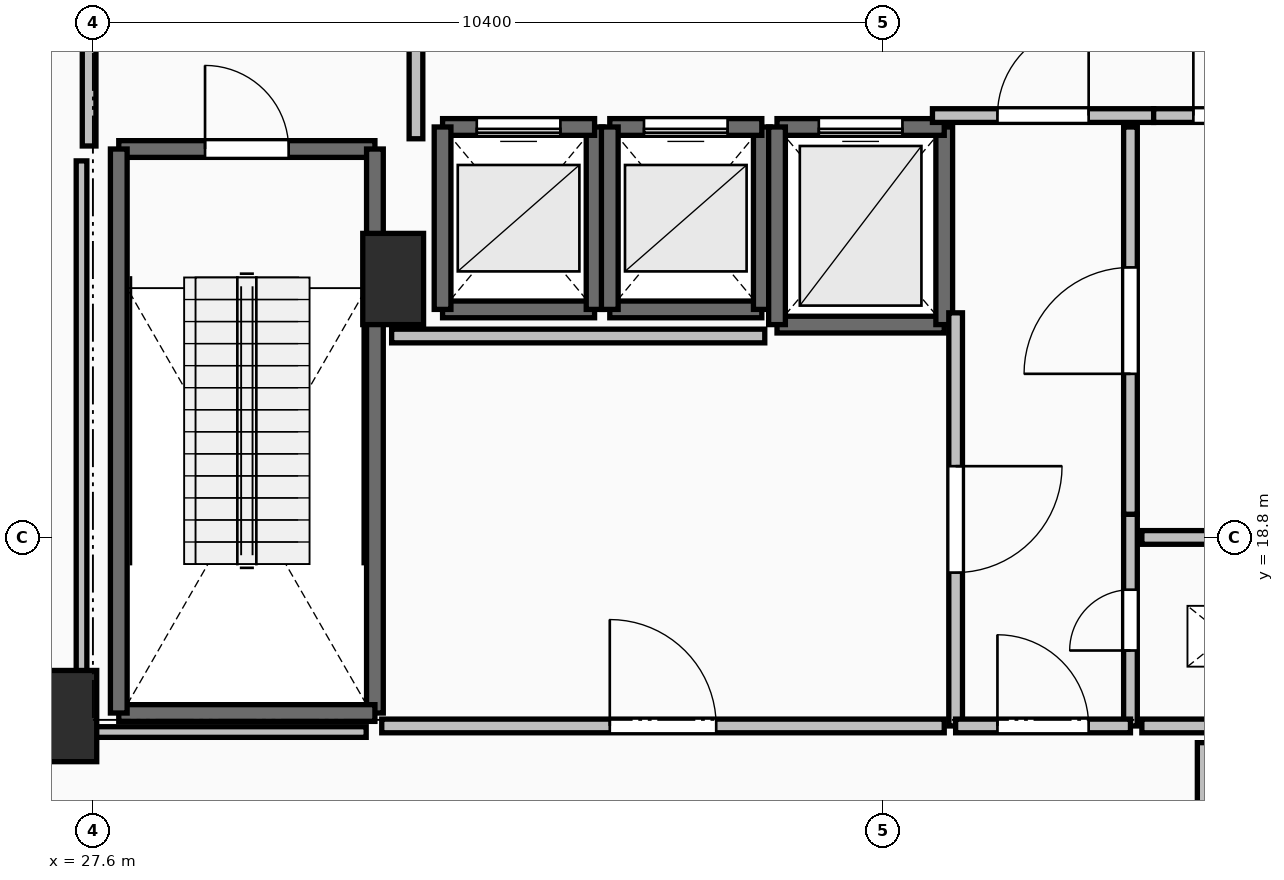
"""IFC4 building model, lengths in metres.
Left out: names, types, materials, properties, quantities, classifications, styles, units other than length and angle.
Written with IfcOpenShell. Run it as: python <this file> out.ifc"""

import sys

from ifc_helpers import new_model, si_unit, direction, frame, frame_2d, origin, origin_2d, place, context, subcontext, project, spatial, rectangle, extrude, element, fill, save


model = new_model("IFC4")
c1 = context("Model", 3, precision=1e-05, world=origin(), true_north=direction((0.0, 1.0)))
c2 = subcontext(c1, "Body", "Model", "MODEL_VIEW")
j1 = project(units=[si_unit("LENGTHUNIT", "METRE"), si_unit("PLANEANGLEUNIT", "RADIAN")], contexts=[c1])
p1 = place(None, origin())
s1 = spatial("IfcSite", under=j1, at=p1, CompositionType="ELEMENT")
p2 = place(p1, origin())
s2 = spatial("IfcBuilding", under=s1, at=p2, CompositionType="ELEMENT")
p3 = place(p2, frame((0.0, 0.0, 124.3)))
s3 = spatial("IfcBuildingStorey", under=s2, at=p3, CompositionType="ELEMENT", Elevation=124.3)
for number, where, z_axis, x_axis in (
    (1, (27.25, 16.45, 0.0), (0.0, 0.0, 1.0), (1.0, 0.0, 0.0)),
    (2, (31.55, 22.2, 0.0), (0.0, 0.0, 1.0), (1.0, 0.0, 0.0)),
):
    element("IfcColumn", number, at=place(p3, frame(where, z_axis=z_axis, x_axis=x_axis)), inside=s3, PredefinedType="PILASTER", context=c2, shape_type="SweptSolid", body=[
        extrude(rectangle(XDim=0.8, YDim=1.2, at=origin_2d()), origin(), (0.0, 0.0, 1.0), 4.8),
    ])
p4 = place(p3, frame((27.94, 23.91, 0.0), z_axis=(0.0, 0.0, 1.0), x_axis=(1.0, 0.0, 0.0)))
e3 = element("IfcWall", 3, at=p4, inside=s3, PredefinedType="SOLIDWALL", context=c2, shape_type="SweptSolid", body=[
    extrude(rectangle(XDim=3.37, YDim=0.22, at=frame_2d((1.685, 0.0))), origin(), (0.0, 0.0, 1.0), 4.54),
])
p5 = place(p4, frame((1.135, 0.0, 0.0)))
e4 = element("IfcOpeningElement", 4, at=p5, cuts=e3, PredefinedType="OPENING", context=c2, shape_type="SweptSolid", body=[
    extrude(rectangle(XDim=1.1, YDim=2.15, at=frame_2d((0.55, 1.075))), frame((0.0, 0.125, 0.0), z_axis=(0.0, -1.0, 0.0), x_axis=(1.0, 0.0, 0.0)), (0.0, 0.0, 1.0), 0.25),
])
p6 = place(p3, frame((31.31, 23.91, 0.0), z_axis=(0.0, 0.0, 1.0), x_axis=(0.0, -1.0, 0.0)))
e5 = element("IfcWall", 5, at=p6, inside=s3, PredefinedType="SOLIDWALL", context=c2, shape_type="SweptSolid", body=[
    extrude(rectangle(XDim=7.42, YDim=0.22, at=frame_2d((3.71, 0.0))), origin(), (0.0, 0.0, 1.0), 4.54),
])
p7 = place(p3, frame((31.31, 16.49, 0.0), z_axis=(0.0, 0.0, 1.0), x_axis=(-1.0, 0.0, 0.0)))
e6 = element("IfcWall", 6, at=p7, inside=s3, PredefinedType="SOLIDWALL", context=c2, shape_type="SweptSolid", body=[
    extrude(rectangle(XDim=3.37, YDim=0.22, at=frame_2d((1.685, 0.0))), origin(), (0.0, 0.0, 1.0), 4.54),
])
p8 = place(p3, frame((27.94, 16.49, 0.0), z_axis=(0.0, 0.0, 1.0), x_axis=(0.0, 1.0, 0.0)))
e7 = element("IfcWall", 7, at=p8, inside=s3, PredefinedType="SOLIDWALL", context=c2, shape_type="SweptSolid", body=[
    extrude(rectangle(XDim=7.42, YDim=0.22, at=frame_2d((3.71, 0.0))), origin(), (0.0, 0.0, 1.0), 4.54),
])
p9 = place(p3, frame((32.2, 21.8, 0.0), z_axis=(0.0, 0.0, 1.0), x_axis=(1.0, 0.0, 0.0)))
e8 = element("IfcWall", 8, at=p9, inside=s3, PredefinedType="SOLIDWALL", context=c2, shape_type="SweptSolid", body=[
    extrude(rectangle(XDim=2.0, YDim=0.22, at=frame_2d((1.0, 0.0))), origin(), (0.0, 0.0, 1.0), 4.54),
])
p10 = place(p3, frame((34.2, 21.8, 0.0), z_axis=(0.0, 0.0, 1.0), x_axis=(0.0, 1.0, 0.0)))
e9 = element("IfcWall", 9, at=p10, inside=s3, PredefinedType="SOLIDWALL", context=c2, shape_type="SweptSolid", body=[
    extrude(rectangle(XDim=2.4, YDim=0.22, at=frame_2d((1.2, 0.0))), origin(), (0.0, 0.0, 1.0), 4.54),
])
p11 = place(p3, frame((34.2, 24.2, 0.0), z_axis=(0.0, 0.0, 1.0), x_axis=(-1.0, 0.0, 0.0)))
e10 = element("IfcWall", 10, at=p11, inside=s3, PredefinedType="SOLIDWALL", context=c2, shape_type="SweptSolid", body=[
    extrude(rectangle(XDim=2.0, YDim=0.22, at=frame_2d((1.0, 0.0))), origin(), (0.0, 0.0, 1.0), 4.54),
])
p12 = place(p11, frame((0.45, 0.0, 0.0)))
e11 = element("IfcOpeningElement", 11, at=p12, cuts=e10, PredefinedType="OPENING", context=c2, shape_type="SweptSolid", body=[
    extrude(rectangle(XDim=1.1, YDim=2.2, at=frame_2d((0.55, 1.1))), frame((0.0, 0.125, 0.0), z_axis=(0.0, -1.0, 0.0), x_axis=(1.0, 0.0, 0.0)), (0.0, 0.0, 1.0), 0.25),
])
p13 = place(p3, frame((32.2, 24.2, 0.0), z_axis=(0.0, 0.0, 1.0), x_axis=(0.0, -1.0, 0.0)))
e12 = element("IfcWall", 12, at=p13, inside=s3, PredefinedType="SOLIDWALL", context=c2, shape_type="SweptSolid", body=[
    extrude(rectangle(XDim=2.4, YDim=0.22, at=frame_2d((1.2, 0.0))), origin(), (0.0, 0.0, 1.0), 4.54),
])
p14 = place(p3, frame((34.4, 21.8, 0.0), z_axis=(0.0, 0.0, 1.0), x_axis=(1.0, 0.0, 0.0)))
e13 = element("IfcWall", 13, at=p14, inside=s3, PredefinedType="SOLIDWALL", context=c2, shape_type="SweptSolid", body=[
    extrude(rectangle(XDim=2.0, YDim=0.22, at=frame_2d((1.0, 0.0))), origin(), (0.0, 0.0, 1.0), 4.54),
])
p15 = place(p3, frame((36.4, 21.8, 0.0), z_axis=(0.0, 0.0, 1.0), x_axis=(0.0, 1.0, 0.0)))
e14 = element("IfcWall", 14, at=p15, inside=s3, PredefinedType="SOLIDWALL", context=c2, shape_type="SweptSolid", body=[
    extrude(rectangle(XDim=2.4, YDim=0.22, at=frame_2d((1.2, 0.0))), origin(), (0.0, 0.0, 1.0), 4.54),
])
p16 = place(p3, frame((36.4, 24.2, 0.0), z_axis=(0.0, 0.0, 1.0), x_axis=(-1.0, 0.0, 0.0)))
e15 = element("IfcWall", 15, at=p16, inside=s3, PredefinedType="SOLIDWALL", context=c2, shape_type="SweptSolid", body=[
    extrude(rectangle(XDim=2.0, YDim=0.22, at=frame_2d((1.0, 0.0))), origin(), (0.0, 0.0, 1.0), 4.54),
])
p17 = place(p16, frame((0.45, 0.0, 0.0)))
e16 = element("IfcOpeningElement", 16, at=p17, cuts=e15, PredefinedType="OPENING", context=c2, shape_type="SweptSolid", body=[
    extrude(rectangle(XDim=1.1, YDim=2.2, at=frame_2d((0.55, 1.1))), frame((0.0, 0.125, 0.0), z_axis=(0.0, -1.0, 0.0), x_axis=(1.0, 0.0, 0.0)), (0.0, 0.0, 1.0), 0.25),
])
p18 = place(p3, frame((34.4, 24.2, 0.0), z_axis=(0.0, 0.0, 1.0), x_axis=(0.0, -1.0, 0.0)))
e17 = element("IfcWall", 17, at=p18, inside=s3, PredefinedType="SOLIDWALL", context=c2, shape_type="SweptSolid", body=[
    extrude(rectangle(XDim=2.4, YDim=0.22, at=frame_2d((1.2, 0.0))), origin(), (0.0, 0.0, 1.0), 4.54),
])
p19 = place(p3, frame((36.6, 21.6, 0.0), z_axis=(0.0, 0.0, 1.0), x_axis=(1.0, 0.0, 0.0)))
e18 = element("IfcWall", 18, at=p19, inside=s3, PredefinedType="SOLIDWALL", context=c2, shape_type="SweptSolid", body=[
    extrude(rectangle(XDim=2.2, YDim=0.22, at=frame_2d((1.1, 0.0))), origin(), (0.0, 0.0, 1.0), 4.54),
])
p20 = place(p3, frame((38.8, 21.6, 0.0), z_axis=(0.0, 0.0, 1.0), x_axis=(0.0, 1.0, 0.0)))
e19 = element("IfcWall", 19, at=p20, inside=s3, PredefinedType="SOLIDWALL", context=c2, shape_type="SweptSolid", body=[
    extrude(rectangle(XDim=2.6, YDim=0.22, at=frame_2d((1.3, 0.0))), origin(), (0.0, 0.0, 1.0), 4.54),
])
p21 = place(p3, frame((38.8, 24.2, 0.0), z_axis=(0.0, 0.0, 1.0), x_axis=(-1.0, 0.0, 0.0)))
e20 = element("IfcWall", 20, at=p21, inside=s3, PredefinedType="SOLIDWALL", context=c2, shape_type="SweptSolid", body=[
    extrude(rectangle(XDim=2.2, YDim=0.22, at=frame_2d((1.1, 0.0))), origin(), (0.0, 0.0, 1.0), 4.54),
])
p22 = place(p21, frame((0.55, 0.0, 0.0)))
e21 = element("IfcOpeningElement", 21, at=p22, cuts=e20, PredefinedType="OPENING", context=c2, shape_type="SweptSolid", body=[
    extrude(rectangle(XDim=1.1, YDim=2.2, at=frame_2d((0.55, 1.1))), frame((0.0, 0.125, 0.0), z_axis=(0.0, -1.0, 0.0), x_axis=(1.0, 0.0, 0.0)), (0.0, 0.0, 1.0), 0.25),
])
p23 = place(p3, frame((36.6, 24.2, 0.0), z_axis=(0.0, 0.0, 1.0), x_axis=(0.0, -1.0, 0.0)))
e22 = element("IfcWall", 22, at=p23, inside=s3, PredefinedType="SOLIDWALL", context=c2, shape_type="SweptSolid", body=[
    extrude(rectangle(XDim=2.6, YDim=0.22, at=frame_2d((1.3, 0.0))), origin(), (0.0, 0.0, 1.0), 4.54),
])
p24 = place(p3, frame((31.85, 24.045, 0.0), z_axis=(0.0, 0.0, 1.0), x_axis=(0.0, 1.0, 0.0)))
e23 = element("IfcWall", 23, at=p24, inside=s3, PredefinedType="PARTITIONING", context=c2, shape_type="SweptSolid", body=[
    extrude(rectangle(XDim=3.91, YDim=0.18, at=frame_2d((1.955, 0.0))), origin(), (0.0, 0.0, 1.0), 4.54),
])
p25 = place(p24, frame((1.355, 0.0, 0.0)))
e24 = element("IfcOpeningElement", 24, at=p25, cuts=e23, PredefinedType="OPENING", context=c2, shape_type="SweptSolid", body=[
    extrude(rectangle(XDim=1.2, YDim=2.15, at=frame_2d((0.6, 1.075))), frame((0.0, 0.105, 0.0), z_axis=(0.0, -1.0, 0.0), x_axis=(1.0, 0.0, 0.0)), (0.0, 0.0, 1.0), 0.21),
])
p26 = place(p3, frame((27.55, 28.0, 0.0), z_axis=(0.0, 0.0, 1.0), x_axis=(0.0, -1.0, 0.0)))
e25 = element("IfcWall", 25, at=p26, inside=s3, PredefinedType="PARTITIONING", context=c2, shape_type="SweptSolid", body=[
    extrude(rectangle(XDim=4.05, YDim=0.18, at=frame_2d((2.025, 0.0))), origin(), (0.0, 0.0, 1.0), 3.522),
])
p27 = place(p26, frame((1.425, 0.0, 0.0)))
e26 = element("IfcOpeningElement", 26, at=p27, cuts=e25, PredefinedType="OPENING", context=c2, shape_type="SweptSolid", body=[
    extrude(rectangle(XDim=1.2, YDim=2.15, at=frame_2d((0.6, 1.075))), frame((0.0, 0.105, 0.0), z_axis=(0.0, -1.0, 0.0), x_axis=(1.0, 0.0, 0.0)), (0.0, 0.0, 1.0), 0.21),
])
p28 = place(p3, frame((38.645, 24.35, 0.0), z_axis=(0.0, 0.0, 1.0), x_axis=(1.0, 0.0, 0.0)))
e27 = element("IfcWall", 27, at=p28, inside=s3, PredefinedType="PARTITIONING", context=c2, shape_type="SweptSolid", body=[
    extrude(rectangle(XDim=2.91, YDim=0.18, at=frame_2d((1.455, 0.0))), origin(), (0.0, 0.0, 1.0), 4.54),
])
p29 = place(p28, frame((0.855, 0.0, 0.0)))
e28 = element("IfcOpeningElement", 28, at=p29, cuts=e27, PredefinedType="OPENING", context=c2, shape_type="SweptSolid", body=[
    extrude(rectangle(XDim=1.2, YDim=2.15, at=frame_2d((0.6, 1.075))), frame((0.0, 0.105, 0.0), z_axis=(0.0, -1.0, 0.0), x_axis=(1.0, 0.0, 0.0)), (0.0, 0.0, 1.0), 0.21),
])
p30 = place(p3, frame((41.555, 24.35, 0.0), z_axis=(0.0, 0.0, 1.0), x_axis=(1.0, 0.0, 0.0)))
e29 = element("IfcWall", 29, at=p30, inside=s3, PredefinedType="PARTITIONING", context=c2, shape_type="SweptSolid", body=[
    extrude(rectangle(XDim=2.445, YDim=0.18, at=frame_2d((1.223, 0.0))), origin(), (0.0, 0.0, 1.0), 4.54),
])
p31 = place(p30, frame((0.522, 0.0, 0.0)))
e30 = element("IfcOpeningElement", 30, at=p31, cuts=e29, PredefinedType="OPENING", context=c2, shape_type="SweptSolid", body=[
    extrude(rectangle(XDim=1.4, YDim=2.2, at=frame_2d((0.7, 1.1))), frame((0.0, 0.105, 0.0), z_axis=(0.0, -1.0, 0.0), x_axis=(1.0, 0.0, 0.0)), (0.0, 0.0, 1.0), 0.21),
])
p32 = place(p3, frame((38.95, 21.755, 0.0), z_axis=(0.0, 0.0, 1.0), x_axis=(0.0, -1.0, 0.0)))
e31 = element("IfcWall", 31, at=p32, inside=s3, PredefinedType="PARTITIONING", context=c2, shape_type="SweptSolid", body=[
    extrude(rectangle(XDim=5.435, YDim=0.18, at=frame_2d((2.717, 0.0))), origin(), (0.0, 0.0, 1.0), 4.54),
])
p33 = place(p32, frame((2.018, 0.0, 0.0)))
e32 = element("IfcOpeningElement", 32, at=p33, cuts=e31, PredefinedType="OPENING", context=c2, shape_type="SweptSolid", body=[
    extrude(rectangle(XDim=1.4, YDim=2.2, at=frame_2d((0.7, 1.1))), frame((0.0, 0.105, 0.0), z_axis=(0.0, -1.0, 0.0), x_axis=(1.0, 0.0, 0.0)), (0.0, 0.0, 1.0), 0.21),
])
p34 = place(p3, frame((41.25, 16.32, 0.0), z_axis=(0.0, 0.0, 1.0), x_axis=(0.0, 1.0, 0.0)))
e33 = element("IfcWall", 33, at=p34, inside=s3, PredefinedType="PARTITIONING", context=c2, shape_type="SweptSolid", body=[
    extrude(rectangle(XDim=2.785, YDim=0.18, at=frame_2d((1.393, 0.0))), origin(), (0.0, 0.0, 1.0), 4.54),
])
p35 = place(p34, frame((0.992, 0.0, 0.0)))
e34 = element("IfcOpeningElement", 34, at=p35, cuts=e33, PredefinedType="OPENING", context=c2, shape_type="SweptSolid", body=[
    extrude(rectangle(XDim=0.8, YDim=2.05, at=frame_2d((0.4, 1.025))), frame((0.0, 0.105, 0.0), z_axis=(0.0, -1.0, 0.0), x_axis=(1.0, 0.0, 0.0)), (0.0, 0.0, 1.0), 0.21),
])
p36 = place(p3, frame((41.25, 19.105, 0.0), z_axis=(0.0, 0.0, 1.0), x_axis=(0.0, 1.0, 0.0)))
e35 = element("IfcWall", 35, at=p36, inside=s3, PredefinedType="PARTITIONING", context=c2, shape_type="SweptSolid", body=[
    extrude(rectangle(XDim=5.095, YDim=0.18, at=frame_2d((2.547, 0.0))), origin(), (0.0, 0.0, 1.0), 4.54),
])
p37 = place(p36, frame((1.847, 0.0, 0.0)))
e36 = element("IfcOpeningElement", 36, at=p37, cuts=e35, PredefinedType="OPENING", context=c2, shape_type="SweptSolid", body=[
    extrude(rectangle(XDim=1.4, YDim=2.2, at=frame_2d((0.7, 1.1))), frame((0.0, 0.105, 0.0), z_axis=(0.0, -1.0, 0.0), x_axis=(1.0, 0.0, 0.0)), (0.0, 0.0, 1.0), 0.21),
])
p38 = place(p3, frame((38.95, 16.32, 0.0), z_axis=(0.0, 0.0, 1.0), x_axis=(1.0, 0.0, 0.0)))
e37 = element("IfcWall", 37, at=p38, inside=s3, PredefinedType="PARTITIONING", context=c2, shape_type="SweptSolid", body=[
    extrude(rectangle(XDim=2.3, YDim=0.18, at=frame_2d((1.15, 0.0))), origin(), (0.0, 0.0, 1.0), 4.54),
])
p39 = place(p38, frame((0.55, 0.0, 0.0)))
e38 = element("IfcOpeningElement", 38, at=p39, cuts=e37, PredefinedType="OPENING", context=c2, shape_type="SweptSolid", body=[
    extrude(rectangle(XDim=1.2, YDim=2.15, at=frame_2d((0.6, 1.075))), frame((0.0, 0.105, 0.0), z_axis=(0.0, -1.0, 0.0), x_axis=(1.0, 0.0, 0.0)), (0.0, 0.0, 1.0), 0.21),
])
p40 = place(p3, frame((31.4, 16.32, 0.0), z_axis=(0.0, 0.0, 1.0), x_axis=(1.0, 0.0, 0.0)))
e39 = element("IfcWall", 39, at=p40, inside=s3, PredefinedType="PARTITIONING", context=c2, shape_type="SweptSolid", body=[
    extrude(rectangle(XDim=7.4, YDim=0.18, at=frame_2d((3.7, 0.0))), origin(), (0.0, 0.0, 1.0), 4.54),
])
p41 = place(p40, frame((3.0, 0.0, 0.0)))
e40 = element("IfcOpeningElement", 40, at=p41, cuts=e39, PredefinedType="OPENING", context=c2, shape_type="SweptSolid", body=[
    extrude(rectangle(XDim=1.4, YDim=2.2, at=frame_2d((0.7, 1.1))), frame((0.0, 0.105, 0.0), z_axis=(0.0, -1.0, 0.0), x_axis=(1.0, 0.0, 0.0)), (0.0, 0.0, 1.0), 0.21),
])
p42 = place(p3, frame((44.6, 18.8, 0.0), z_axis=(0.0, 0.0, 1.0), x_axis=(-1.0, 0.0, 0.0)))
e41 = element("IfcWall", 41, at=p42, inside=s3, PredefinedType="PARTITIONING", context=c2, shape_type="SweptSolid", body=[
    extrude(rectangle(XDim=3.2, YDim=0.18, at=frame_2d((1.6, 0.0))), origin(), (0.0, 0.0, 1.0), 4.54),
])
p43 = place(p3, frame((41.4, 16.32, 0.0), z_axis=(0.0, 0.0, 1.0), x_axis=(1.0, 0.0, 0.0)))
e42 = element("IfcWall", 42, at=p43, inside=s3, PredefinedType="PARTITIONING", context=c2, shape_type="SweptSolid", body=[
    extrude(rectangle(XDim=3.2, YDim=0.18, at=frame_2d((1.6, 0.0))), origin(), (0.0, 0.0, 1.0), 4.54),
])
p44 = place(p43, frame((1.2, 0.0, 0.0)))
e43 = element("IfcOpeningElement", 43, at=p44, cuts=e42, PredefinedType="OPENING", context=c2, shape_type="SweptSolid", body=[
    extrude(rectangle(XDim=0.8, YDim=2.05, at=frame_2d((0.4, 1.025))), frame((0.0, 0.105, 0.0), z_axis=(0.0, -1.0, 0.0), x_axis=(1.0, 0.0, 0.0)), (0.0, 0.0, 1.0), 0.21),
])
p45 = place(p3, frame((36.439, 21.45, 0.0), z_axis=(0.0, 0.0, 1.0), x_axis=(-1.0, 0.0, 0.0)))
e44 = element("IfcWall", 44, at=p45, inside=s3, PredefinedType="PARTITIONING", context=c2, shape_type="SweptSolid", body=[
    extrude(rectangle(XDim=4.909, YDim=0.18, at=frame_2d((2.455, 0.0))), origin(), (0.0, 0.0, 1.0), 4.54),
])
p46 = place(p3, frame((27.45, 23.754, 0.0), z_axis=(0.0, 0.0, 1.0), x_axis=(0.0, -1.0, 0.0)))
e45 = element("IfcWall", 45, at=p46, inside=s3, PredefinedType="PARTITIONING", context=c2, shape_type="SweptSolid", body=[
    extrude(rectangle(XDim=7.514, YDim=0.14, at=frame_2d((3.757, 0.0))), origin(), (0.0, 0.0, 1.0), 3.522),
])
p47 = place(p3, frame((27.45, 16.24, 0.0), z_axis=(0.0, 0.0, 1.0), x_axis=(1.0, 0.0, 0.0)))
e46 = element("IfcWall", 46, at=p47, inside=s3, PredefinedType="PARTITIONING", context=c2, shape_type="SweptSolid", body=[
    extrude(rectangle(XDim=3.745, YDim=0.14, at=frame_2d((1.873, 0.0))), origin(), (0.0, 0.0, 1.0), 3.522),
])
p48 = place(p3, frame((42.2, 16.1, 0.0), z_axis=(0.0, 0.0, 1.0), x_axis=(0.0, -1.0, 0.0)))
e47 = element("IfcWall", 47, at=p48, inside=s3, PredefinedType="PARTITIONING", context=c2, shape_type="SweptSolid", body=[
    extrude(rectangle(XDim=1.83, YDim=0.14, at=frame_2d((0.915, 0.0))), origin(), (0.0, 0.0, 1.0), 4.54),
])
p49 = place(p5, origin())
e48 = element("IfcDoor", 48, at=p49, inside=s3, OperationType="SINGLE_SWING_LEFT", PredefinedType="DOOR", context=c2, shape_type="SweptSolid", body=[
    extrude(rectangle(XDim=1.1, YDim=2.15, at=frame_2d((0.55, 1.075))), frame((0.0, 0.025, 0.0), z_axis=(0.0, -1.0, 0.0), x_axis=(1.0, 0.0, 0.0)), (0.0, 0.0, 1.0), 0.05),
])
fill(e4, e48)
p50 = place(p12, origin())
e49 = element("IfcDoor", 49, at=p50, inside=s3, OperationType="SLIDING_TO_LEFT", PredefinedType="DOOR", context=c2, shape_type="SweptSolid", body=[
    extrude(rectangle(XDim=1.1, YDim=2.2, at=frame_2d((0.55, 1.1))), frame((0.0, 0.025, 0.0), z_axis=(0.0, -1.0, 0.0), x_axis=(1.0, 0.0, 0.0)), (0.0, 0.0, 1.0), 0.05),
])
fill(e11, e49)
p51 = place(p17, origin())
e50 = element("IfcDoor", 50, at=p51, inside=s3, OperationType="SLIDING_TO_LEFT", PredefinedType="DOOR", context=c2, shape_type="SweptSolid", body=[
    extrude(rectangle(XDim=1.1, YDim=2.2, at=frame_2d((0.55, 1.1))), frame((0.0, 0.025, 0.0), z_axis=(0.0, -1.0, 0.0), x_axis=(1.0, 0.0, 0.0)), (0.0, 0.0, 1.0), 0.05),
])
fill(e16, e50)
p52 = place(p22, origin())
e51 = element("IfcDoor", 51, at=p52, inside=s3, OperationType="SLIDING_TO_LEFT", PredefinedType="DOOR", context=c2, shape_type="SweptSolid", body=[
    extrude(rectangle(XDim=1.1, YDim=2.2, at=frame_2d((0.55, 1.1))), frame((0.0, 0.025, 0.0), z_axis=(0.0, -1.0, 0.0), x_axis=(1.0, 0.0, 0.0)), (0.0, 0.0, 1.0), 0.05),
])
fill(e21, e51)
p53 = place(p29, origin())
e52 = element("IfcDoor", 52, at=p53, inside=s3, OperationType="SINGLE_SWING_RIGHT", PredefinedType="DOOR", context=c2, shape_type="SweptSolid", body=[
    extrude(rectangle(XDim=1.2, YDim=2.15, at=frame_2d((0.6, 1.075))), frame((0.0, 0.025, 0.0), z_axis=(0.0, -1.0, 0.0), x_axis=(1.0, 0.0, 0.0)), (0.0, 0.0, 1.0), 0.05),
])
fill(e28, e52)
p54 = place(p31, origin())
e53 = element("IfcDoor", 53, at=p54, inside=s3, OperationType="DOUBLE_SWING_LEFT", PredefinedType="DOOR", context=c2, shape_type="SweptSolid", body=[
    extrude(rectangle(XDim=1.4, YDim=2.2, at=frame_2d((0.7, 1.1))), frame((0.0, 0.025, 0.0), z_axis=(0.0, -1.0, 0.0), x_axis=(1.0, 0.0, 0.0)), (0.0, 0.0, 1.0), 0.05),
])
fill(e30, e53)
p55 = place(p33, origin())
e54 = element("IfcDoor", 54, at=p55, inside=s3, OperationType="DOUBLE_SWING_LEFT", PredefinedType="DOOR", context=c2, shape_type="SweptSolid", body=[
    extrude(rectangle(XDim=1.4, YDim=2.2, at=frame_2d((0.7, 1.1))), frame((0.0, 0.025, 0.0), z_axis=(0.0, -1.0, 0.0), x_axis=(1.0, 0.0, 0.0)), (0.0, 0.0, 1.0), 0.05),
])
fill(e32, e54)
p56 = place(p35, origin())
e55 = element("IfcDoor", 55, at=p56, inside=s3, OperationType="SINGLE_SWING_LEFT", PredefinedType="DOOR", context=c2, shape_type="SweptSolid", body=[
    extrude(rectangle(XDim=0.8, YDim=2.05, at=frame_2d((0.4, 1.025))), frame((0.0, 0.025, 0.0), z_axis=(0.0, -1.0, 0.0), x_axis=(1.0, 0.0, 0.0)), (0.0, 0.0, 1.0), 0.05),
])
fill(e34, e55)
p57 = place(p37, origin())
e56 = element("IfcDoor", 56, at=p57, inside=s3, OperationType="DOUBLE_SWING_LEFT", PredefinedType="DOOR", context=c2, shape_type="SweptSolid", body=[
    extrude(rectangle(XDim=1.4, YDim=2.2, at=frame_2d((0.7, 1.1))), frame((0.0, 0.025, 0.0), z_axis=(0.0, -1.0, 0.0), x_axis=(1.0, 0.0, 0.0)), (0.0, 0.0, 1.0), 0.05),
])
fill(e36, e56)
p58 = place(p39, origin())
e57 = element("IfcDoor", 57, at=p58, inside=s3, OperationType="SINGLE_SWING_LEFT", PredefinedType="DOOR", context=c2, shape_type="SweptSolid", body=[
    extrude(rectangle(XDim=1.2, YDim=2.15, at=frame_2d((0.6, 1.075))), frame((0.0, 0.025, 0.0), z_axis=(0.0, -1.0, 0.0), x_axis=(1.0, 0.0, 0.0)), (0.0, 0.0, 1.0), 0.05),
])
fill(e38, e57)
p59 = place(p41, origin())
e58 = element("IfcDoor", 58, at=p59, inside=s3, OperationType="DOUBLE_SWING_LEFT", PredefinedType="DOOR", context=c2, shape_type="SweptSolid", body=[
    extrude(rectangle(XDim=1.4, YDim=2.2, at=frame_2d((0.7, 1.1))), frame((0.0, 0.025, 0.0), z_axis=(0.0, -1.0, 0.0), x_axis=(1.0, 0.0, 0.0)), (0.0, 0.0, 1.0), 0.05),
])
fill(e40, e58)
save(model, sys.argv[1])
